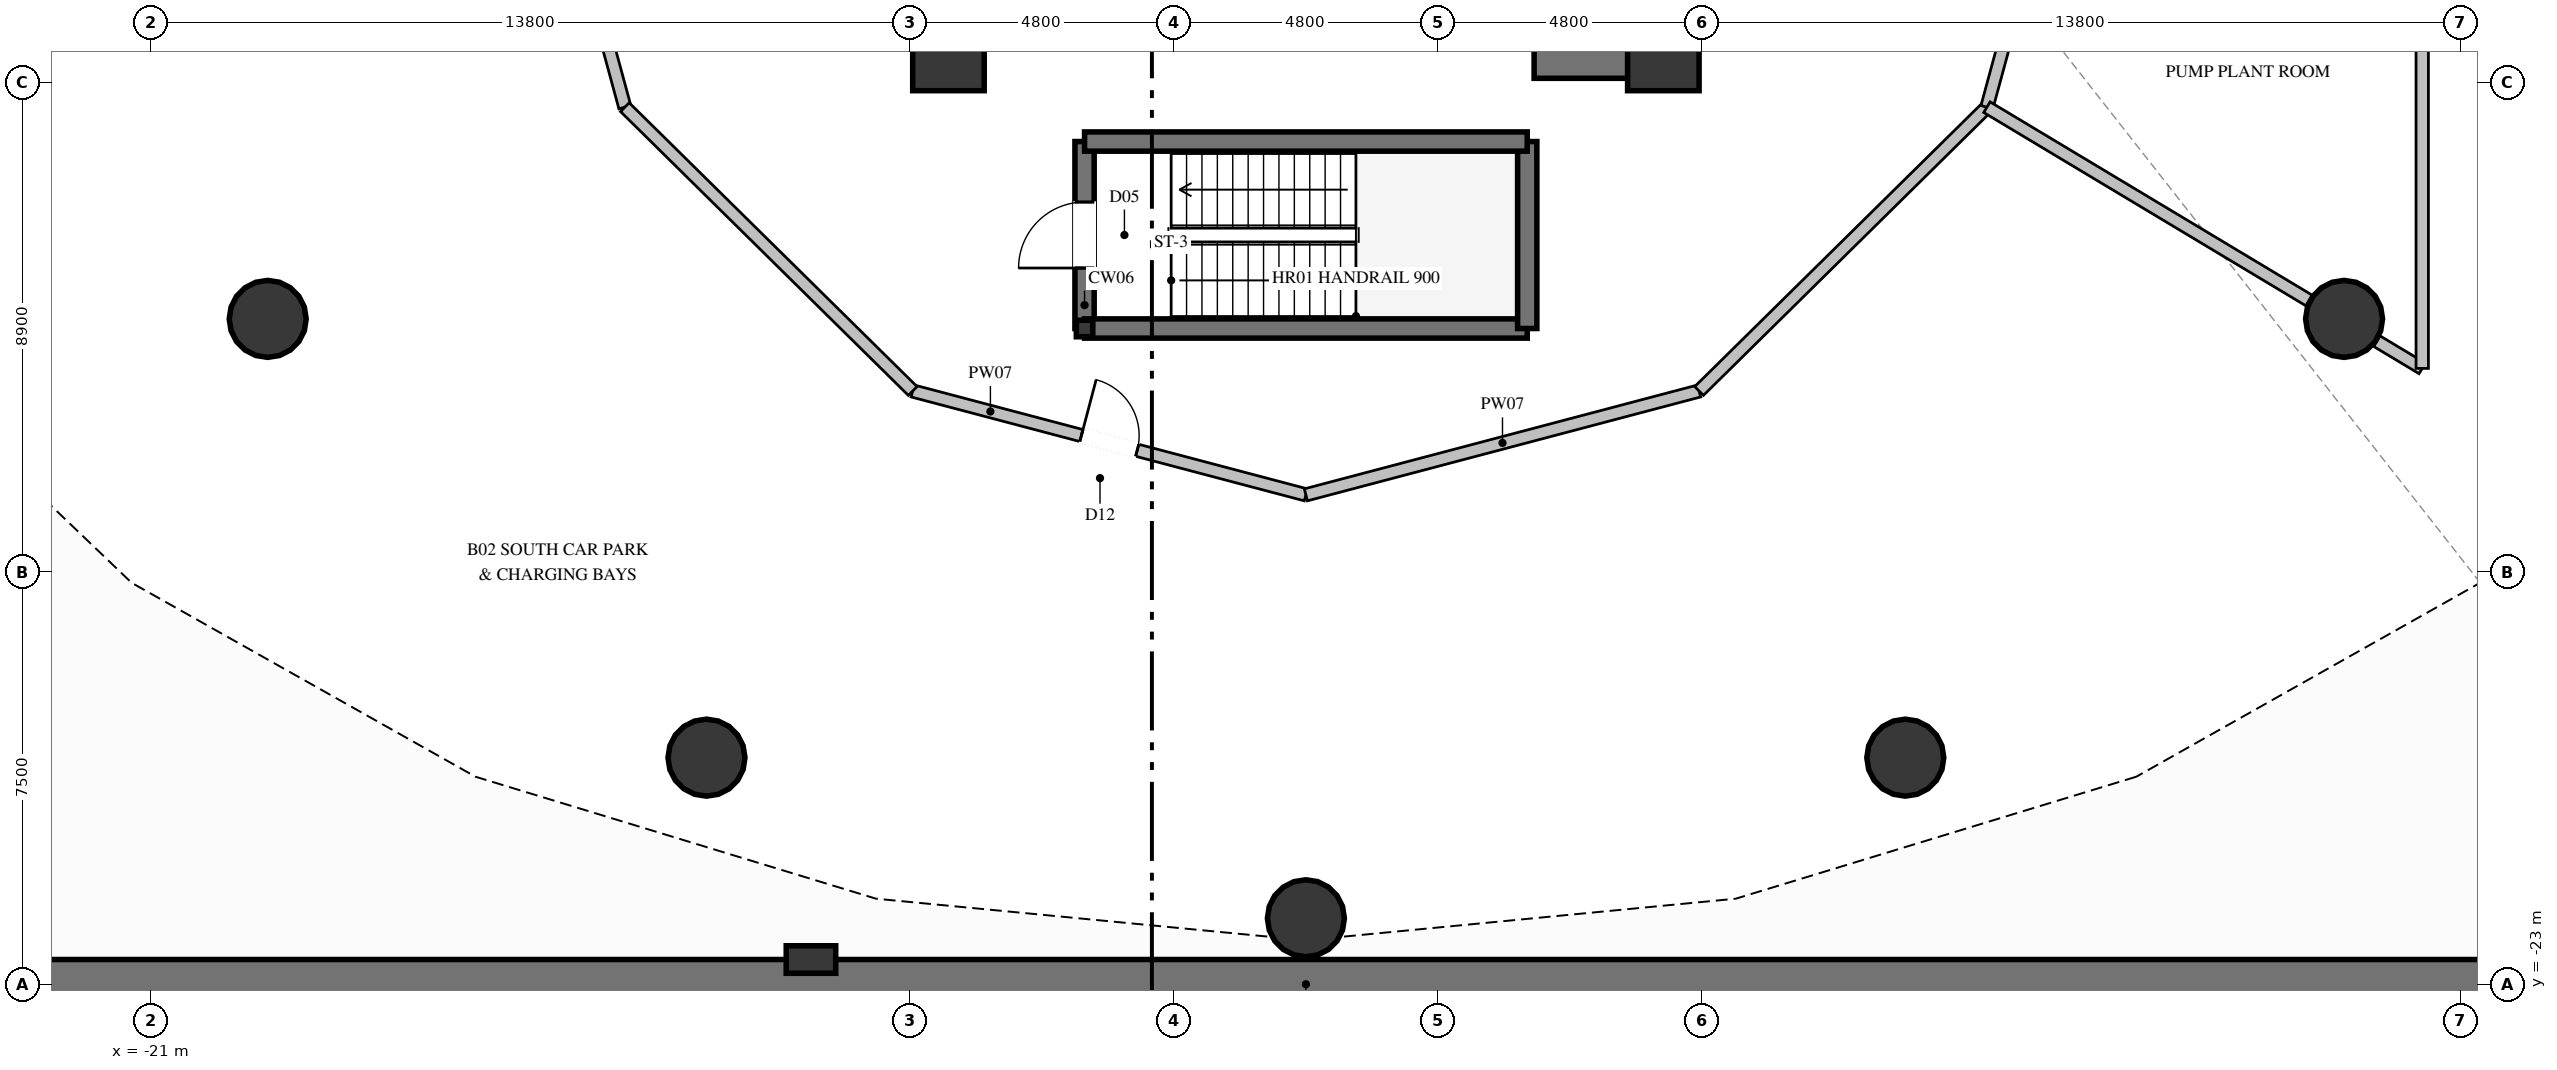
"""IFC4 building model, lengths in metres.
Left out: names, types, materials, properties, quantities, classifications, styles, units other than length and angle.
Written with IfcOpenShell. Run it as: python <this file> out.ifc"""

import sys

from ifc_helpers import new_model, si_unit, direction, frame, frame_2d, origin, origin_2d, place, context, subcontext, project, spatial, rectangle, hollow_rectangle, circle, extrude, element, fill, save


model = new_model("IFC4")
c1 = context("Model", 3, precision=1e-05, world=origin(), true_north=direction((0.0, 1.0)))
c2 = subcontext(c1, "Body", "Model", "MODEL_VIEW")
j1 = project(units=[si_unit("LENGTHUNIT", "METRE"), si_unit("PLANEANGLEUNIT", "RADIAN")], contexts=[c1])
p1 = place(None, origin())
s1 = spatial("IfcSite", under=j1, at=p1, CompositionType="ELEMENT")
p2 = place(p1, origin())
s2 = spatial("IfcBuilding", under=s1, at=p2, CompositionType="ELEMENT")
p3 = place(p2, frame((0.0, 0.0, -9.6)))
s3 = spatial("IfcBuildingStorey", under=s2, at=p3, CompositionType="ELEMENT", Elevation=-9.6)
p4 = place(p3, frame((-31.45, -23.0, 0.0), z_axis=(0.0, 0.0, 1.0), x_axis=(1.0, 0.0, 0.0)))
e1 = element("IfcWall", 1, at=p4, inside=s3, PredefinedType="SHEAR", context=c2, shape_type="SweptSolid", body=[
    extrude(rectangle(XDim=62.9, YDim=0.9, at=frame_2d((31.45, 0.0))), origin(), (0.0, 0.0, 1.0), 4.8),
])
p5 = place(p3, frame((-9.0, -22.55, 0.0), z_axis=(0.0, 0.0, 1.0), x_axis=(0.0, 1.0, 0.0)))
e2 = element("IfcColumn", 2, at=p5, inside=s3, PredefinedType="PILASTER", context=c2, shape_type="SweptSolid", body=[
    extrude(rectangle(XDim=0.5, YDim=0.9, at=origin_2d()), origin(), (0.0, 0.0, 1.0), 4.8),
])
for number, where, z_axis, x_axis in (
    (3, (-6.5, -6.1, 0.0), (0.0, 0.0, 1.0), (1.0, 0.0, 0.0)),
    (4, (6.5, -6.1, 0.0), (0.0, 0.0, 1.0), (1.0, 0.0, 0.0)),
):
    element("IfcColumn", number, at=place(p3, frame(where, z_axis=z_axis, x_axis=x_axis)), inside=s3, PredefinedType="COLUMN", context=c2, shape_type="SweptSolid", body=[
        extrude(rectangle(XDim=1.3, YDim=1.3, at=origin_2d()), origin(), (0.0, 0.0, 1.0), 4.8),
    ])
p6 = place(p3, frame((-6.075, -6.1, 0.0), z_axis=(0.0, 0.0, 1.0), x_axis=(1.0, 0.0, 0.0)))
e5 = element("IfcWall", 5, at=p6, inside=s3, PredefinedType="SHEAR", context=c2, shape_type="SweptSolid", body=[
    extrude(rectangle(XDim=0.225, YDim=0.85, at=frame_2d((0.112, 0.0))), origin(), (0.0, 0.0, 1.0), 4.8),
])
p7 = place(p3, frame((4.15, -6.1, 0.0), z_axis=(0.0, 0.0, 1.0), x_axis=(1.0, 0.0, 0.0)))
e6 = element("IfcWall", 6, at=p7, inside=s3, PredefinedType="SHEAR", context=c2, shape_type="SweptSolid", body=[
    extrude(rectangle(XDim=1.925, YDim=0.85, at=frame_2d((0.962, 0.0))), origin(), (0.0, 0.0, 1.0), 4.8),
])
p8 = place(p3, frame((-6.5, -6.525, 0.0), z_axis=(0.0, 0.0, 1.0), x_axis=(0.0, 1.0, 0.0)))
e7 = element("IfcWall", 7, at=p8, inside=s3, PredefinedType="SHEAR", context=c2, shape_type="SweptSolid", body=[
    extrude(rectangle(XDim=3.175, YDim=0.85, at=frame_2d((1.587, 0.0))), origin(), (0.0, 0.0, 1.0), 4.8),
])
p9 = place(p3, frame((6.5, -6.525, 0.0), z_axis=(0.0, 0.0, 1.0), x_axis=(0.0, 1.0, 0.0)))
e8 = element("IfcWall", 8, at=p9, inside=s3, PredefinedType="SHEAR", context=c2, shape_type="SweptSolid", body=[
    extrude(rectangle(XDim=4.175, YDim=0.85, at=frame_2d((2.087, 0.0))), origin(), (0.0, 0.0, 1.0), 4.8),
])
for number, where, z_axis, x_axis in (
    (9, (-18.879, -10.9, 0.0), (0.0, 0.0, 1.0), (1.0, 0.0, 0.0)),
    (10, (-10.9, -18.879, 0.0), (0.0, 0.0, 1.0), (1.0, 0.0, 0.0)),
    (11, (0.0, -21.8, 0.0), (0.0, 0.0, 1.0), (1.0, 0.0, 0.0)),
    (12, (10.9, -18.879, 0.0), (0.0, 0.0, 1.0), (1.0, 0.0, 0.0)),
    (13, (18.879, -10.9, 0.0), (0.0, 0.0, 1.0), (1.0, 0.0, 0.0)),
):
    element("IfcColumn", number, at=place(p3, frame(where, z_axis=z_axis, x_axis=x_axis)), inside=s3, PredefinedType="COLUMN", context=c2, shape_type="SweptSolid", body=[
        extrude(circle(Radius=0.7, at=origin_2d()), origin(), (0.0, 0.0, 1.0), 4.8),
    ])
p10 = place(p3, frame((-4.025, -11.075, 0.0), z_axis=(0.0, 0.0, 1.0), x_axis=(1.0, 0.0, 0.0)))
e14 = element("IfcColumn", 14, at=p10, inside=s3, PredefinedType="COLUMN", context=c2, shape_type="SweptSolid", body=[
    extrude(hollow_rectangle(XDim=0.3, YDim=0.3, WallThickness=0.016, at=origin_2d()), origin(), (0.0, 0.0, 1.0), 4.8),
])
p11 = place(p3, frame((-4.025, -11.075, 0.0), z_axis=(0.0, 0.0, 1.0), x_axis=(0.0, 1.0, 0.0)))
e15 = element("IfcWall", 15, at=p11, inside=s3, PredefinedType="SOLIDWALL", context=c2, shape_type="SweptSolid", body=[
    extrude(rectangle(XDim=3.4, YDim=0.35, at=frame_2d((1.7, 0.0))), origin(), (0.0, 0.0, 1.0), 4.46),
])
p12 = place(p11, frame((1.1, 0.0, 0.0)))
e16 = element("IfcOpeningElement", 16, at=p12, cuts=e15, PredefinedType="OPENING", context=c2, shape_type="SweptSolid", body=[
    extrude(rectangle(XDim=1.2, YDim=2.2, at=frame_2d((0.6, 1.1))), frame((0.0, 0.185, 0.0), z_axis=(0.0, -1.0, 0.0), x_axis=(1.0, 0.0, 0.0)), (0.0, 0.0, 1.0), 0.37),
])
p13 = place(p3, frame((-4.025, -11.075, 0.0), z_axis=(0.0, 0.0, 1.0), x_axis=(1.0, 0.0, 0.0)))
e17 = element("IfcWall", 17, at=p13, inside=s3, PredefinedType="SOLIDWALL", context=c2, shape_type="SweptSolid", body=[
    extrude(rectangle(XDim=8.05, YDim=0.35, at=frame_2d((4.025, 0.0))), origin(), (0.0, 0.0, 1.0), 4.46),
])
p14 = place(p3, frame((4.025, -11.075, 0.0), z_axis=(0.0, 0.0, 1.0), x_axis=(0.0, 1.0, 0.0)))
e18 = element("IfcWall", 18, at=p14, inside=s3, PredefinedType="SOLIDWALL", context=c2, shape_type="SweptSolid", body=[
    extrude(rectangle(XDim=3.4, YDim=0.35, at=frame_2d((1.7, 0.0))), origin(), (0.0, 0.0, 1.0), 4.46),
])
p15 = place(p3, frame((4.025, -7.675, 0.0), z_axis=(0.0, 0.0, 1.0), x_axis=(-1.0, 0.0, 0.0)))
e19 = element("IfcWall", 19, at=p15, inside=s3, PredefinedType="SOLIDWALL", context=c2, shape_type="SweptSolid", body=[
    extrude(rectangle(XDim=8.05, YDim=0.35, at=frame_2d((4.025, 0.0))), origin(), (0.0, 0.0, 1.0), 4.46),
])
p16 = place(p3, frame((-14.3, 0.0, 0.0), z_axis=(0.0, 0.0, 1.0), x_axis=(0.262260528785, -0.964997106235, 0.0)))
e20 = element("IfcWall", 20, at=p16, inside=s3, PredefinedType="PARTITIONING", context=c2, shape_type="SweptSolid", body=[
    extrude(rectangle(XDim=7.306, YDim=0.225, at=frame_2d((3.653, 0.0))), origin(), (0.0, 0.0, 1.0), 4.46),
])
p17 = place(p3, frame((-7.15, -12.211, 0.0), z_axis=(0.0, 0.0, 1.0), x_axis=(0.966820901533, -0.255455170937, 0.0)))
e21 = element("IfcWall", 21, at=p17, inside=s3, PredefinedType="PARTITIONING", context=c2, shape_type="SweptSolid", body=[
    extrude(rectangle(XDim=7.395, YDim=0.225, at=frame_2d((3.698, 0.0))), origin(), (0.0, 0.0, 1.0), 4.46),
])
p18 = place(p17, frame((3.173, 0.0, 0.0)))
e22 = element("IfcOpeningElement", 22, at=p18, cuts=e21, PredefinedType="OPENING", context=c2, shape_type="SweptSolid", body=[
    extrude(rectangle(XDim=1.05, YDim=2.15, at=frame_2d((0.525, 1.075))), frame((0.0, 0.123, 0.0), z_axis=(0.0, -1.0, 0.0), x_axis=(1.0, 0.0, 0.0)), (0.0, 0.0, 1.0), 0.245),
])
p19 = place(p3, frame((-12.384, -7.05, 0.0), z_axis=(0.0, 0.0, 1.0), x_axis=(0.712071304345, -0.702107155303, 0.0)))
e23 = element("IfcWall", 23, at=p19, inside=s3, PredefinedType="PARTITIONING", context=c2, shape_type="SweptSolid", body=[
    extrude(rectangle(XDim=7.351, YDim=0.225, at=frame_2d((3.675, 0.0))), origin(), (0.0, 0.0, 1.0), 4.46),
])
p20 = place(p3, frame((0.0, -14.1, 0.0), z_axis=(0.0, 0.0, 1.0), x_axis=(0.966820901533, 0.255455170937, 0.0)))
e24 = element("IfcWall", 24, at=p20, inside=s3, PredefinedType="PARTITIONING", context=c2, shape_type="SweptSolid", body=[
    extrude(rectangle(XDim=7.395, YDim=0.225, at=frame_2d((3.698, 0.0))), origin(), (0.0, 0.0, 1.0), 4.46),
])
p21 = place(p3, frame((7.15, -12.211, 0.0), z_axis=(0.0, 0.0, 1.0), x_axis=(0.712071304345, 0.702107155303, 0.0)))
e25 = element("IfcWall", 25, at=p21, inside=s3, PredefinedType="PARTITIONING", context=c2, shape_type="SweptSolid", body=[
    extrude(rectangle(XDim=7.351, YDim=0.225, at=frame_2d((3.675, 0.0))), origin(), (0.0, 0.0, 1.0), 4.46),
])
p22 = place(p3, frame((12.384, -7.05, 0.0), z_axis=(0.0, 0.0, 1.0), x_axis=(0.262260528785, 0.964997106235, 0.0)))
e26 = element("IfcWall", 26, at=p22, inside=s3, PredefinedType="PARTITIONING", context=c2, shape_type="SweptSolid", body=[
    extrude(rectangle(XDim=7.306, YDim=0.225, at=frame_2d((3.653, 0.0))), origin(), (0.0, 0.0, 1.0), 4.46),
])
p23 = place(p22, frame((3.128, 0.0, 0.0)))
e27 = element("IfcOpeningElement", 27, at=p23, cuts=e26, PredefinedType="OPENING", context=c2, shape_type="SweptSolid", body=[
    extrude(rectangle(XDim=1.05, YDim=2.15, at=frame_2d((0.525, 1.075))), frame((0.0, 0.123, 0.0), z_axis=(0.0, -1.0, 0.0), x_axis=(1.0, 0.0, 0.0)), (0.0, 0.0, 1.0), 0.245),
])
p24 = place(p3, frame((20.3, -11.8, 0.0), z_axis=(0.0, 0.0, 1.0), x_axis=(-0.857425748935, 0.51460770016, 0.0)))
e28 = element("IfcWall", 28, at=p24, inside=s3, PredefinedType="PARTITIONING", context=c2, shape_type="SweptSolid", body=[
    extrude(rectangle(XDim=0.962, YDim=0.225, at=frame_2d((0.481, 0.0))), origin(), (0.0, 0.0, 1.0), 3.695),
])
p25 = place(p3, frame((18.242, -10.565, 0.0), z_axis=(0.0, 0.0, 1.0), x_axis=(-0.857483465664, 0.514511521846, 0.0)))
e29 = element("IfcWall", 29, at=p25, inside=s3, PredefinedType="PARTITIONING", context=c2, shape_type="SweptSolid", body=[
    extrude(rectangle(XDim=6.832, YDim=0.225, at=frame_2d((3.416, 0.0))), origin(), (0.0, 0.0, 1.0), 3.75),
])
p26 = place(p3, frame((20.3, 0.0, 0.0), z_axis=(0.0, 0.0, 1.0), x_axis=(0.0, -1.0, 0.0)))
e30 = element("IfcWall", 30, at=p26, inside=s3, PredefinedType="PARTITIONING", context=c2, shape_type="SweptSolid", body=[
    extrude(rectangle(XDim=11.8, YDim=0.225, at=frame_2d((5.9, 0.0))), origin(), (0.0, 0.0, 1.0), 4.46),
])
p27 = place(p12, origin())
e31 = element("IfcDoor", 31, at=p27, inside=s3, OperationType="SINGLE_SWING_LEFT", PredefinedType="DOOR", context=c2, shape_type="SweptSolid", body=[
    extrude(rectangle(XDim=1.2, YDim=2.2, at=frame_2d((0.6, 1.1))), frame((0.0, 0.025, 0.0), z_axis=(0.0, -1.0, 0.0), x_axis=(1.0, 0.0, 0.0)), (0.0, 0.0, 1.0), 0.05),
])
fill(e16, e31)
p28 = place(p18, origin())
e32 = element("IfcDoor", 32, at=p28, inside=s3, OperationType="SINGLE_SWING_LEFT", PredefinedType="DOOR", context=c2, shape_type="SweptSolid", body=[
    extrude(rectangle(XDim=1.05, YDim=2.15, at=frame_2d((0.525, 1.075))), frame((0.0, 0.025, 0.0), z_axis=(0.0, -1.0, 0.0), x_axis=(1.0, 0.0, 0.0)), (0.0, 0.0, 1.0), 0.05),
])
fill(e22, e32)
save(model, sys.argv[1])
